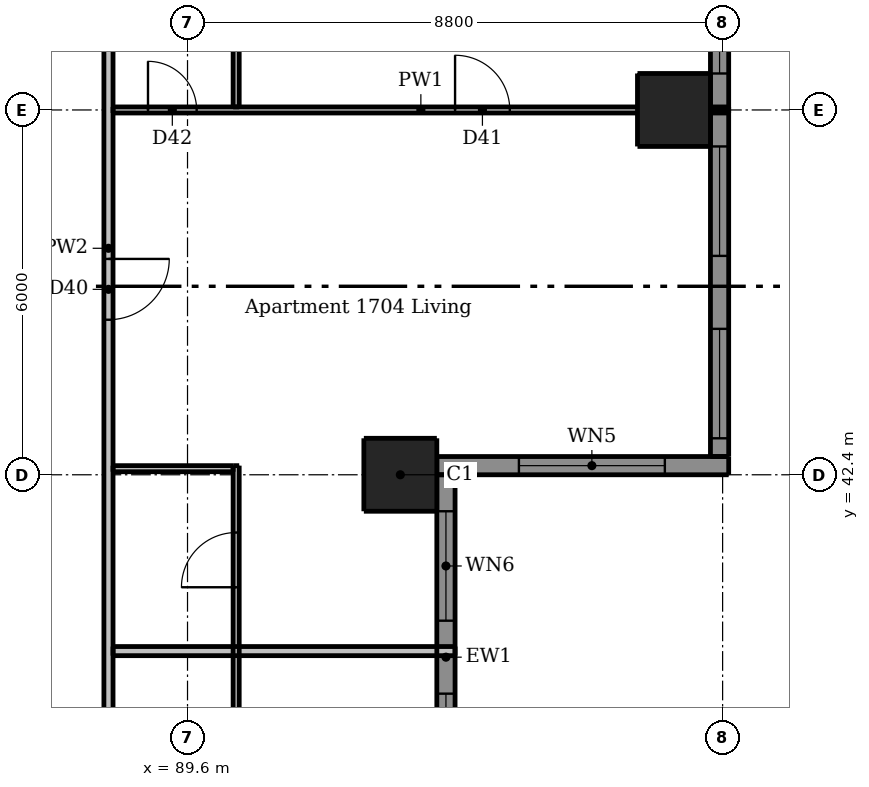
"""IFC4 building model, lengths in metres.
Left out: names, types, materials, properties, quantities, classifications, styles, units other than length and angle.
Written with IfcOpenShell. Run it as: python <this file> out.ifc"""

import sys

from ifc_helpers import new_model, si_unit, direction, frame, frame_2d, origin, origin_2d, place, context, subcontext, project, spatial, rectangle, extrude, element, fill, save


model = new_model("IFC4")
c1 = context("Model", 3, precision=1e-05, world=origin(), true_north=direction((0.0, 1.0)))
c2 = subcontext(c1, "Body", "Model", "MODEL_VIEW")
j1 = project(units=[si_unit("LENGTHUNIT", "METRE"), si_unit("PLANEANGLEUNIT", "RADIAN")], contexts=[c1])
p1 = place(None, origin())
s1 = spatial("IfcSite", under=j1, at=p1, CompositionType="ELEMENT")
p2 = place(p1, origin())
s2 = spatial("IfcBuilding", under=s1, at=p2, CompositionType="ELEMENT")
p3 = place(p2, frame((0.0, 0.0, 63.1)))
s3 = spatial("IfcBuildingStorey", under=s2, at=p3, CompositionType="ELEMENT", Elevation=63.1)
for number, where, z_axis, x_axis in (
    (1, (93.1, 42.4, 0.0), (0.0, 0.0, 1.0), (1.0, 0.0, 0.0)),
    (2, (97.6, 48.4, 0.0), (0.0, 0.0, 1.0), (1.0, 0.0, 0.0)),
):
    element("IfcColumn", number, at=place(p3, frame(where, z_axis=z_axis, x_axis=x_axis)), inside=s3, PredefinedType="COLUMN", context=c2, shape_type="SweptSolid", body=[
        extrude(rectangle(XDim=1.2, YDim=1.2, at=origin_2d()), origin(), (0.0, 0.0, 1.0), 3.05),
    ])
p4 = place(p3, frame((93.7, 42.55, 0.0), z_axis=(0.0, 0.0, 1.0), x_axis=(1.0, 0.0, 0.0)))
e3 = element("IfcWall", 3, at=p4, inside=s3, PredefinedType="SOLIDWALL", context=c2, shape_type="SweptSolid", body=[
    extrude(rectangle(XDim=4.8, YDim=0.3, at=frame_2d((2.4, 0.0))), origin(), (0.0, 0.0, 1.0), 3.05),
])
p5 = place(p4, frame((1.35, 0.0, 0.15)))
e4 = element("IfcOpeningElement", 4, at=p5, cuts=e3, PredefinedType="OPENING", context=c2, shape_type="SweptSolid", body=[
    extrude(rectangle(XDim=2.4, YDim=2.1, at=frame_2d((1.2, 1.05))), frame((0.0, 0.16, 0.0), z_axis=(0.0, -1.0, 0.0), x_axis=(1.0, 0.0, 0.0)), (0.0, 0.0, 1.0), 0.32),
])
p6 = place(p3, frame((93.85, 36.4, 0.0), z_axis=(0.0, 0.0, 1.0), x_axis=(0.0, 1.0, 0.0)))
e5 = element("IfcWall", 5, at=p6, inside=s3, PredefinedType="SOLIDWALL", context=c2, shape_type="SweptSolid", body=[
    extrude(rectangle(XDim=6.0, YDim=0.3, at=frame_2d((3.0, 0.0))), origin(), (0.0, 0.0, 1.0), 3.05),
])
p7 = place(p6, frame((0.6, 0.0, 0.15)))
e6 = element("IfcOpeningElement", 6, at=p7, cuts=e5, PredefinedType="OPENING", context=c2, shape_type="SweptSolid", body=[
    extrude(rectangle(XDim=1.8, YDim=2.1, at=frame_2d((0.9, 1.05))), frame((0.0, 0.16, 0.0), z_axis=(0.0, -1.0, 0.0), x_axis=(1.0, 0.0, 0.0)), (0.0, 0.0, 1.0), 0.32),
])
p8 = place(p6, frame((3.6, 0.0, 0.15)))
e7 = element("IfcOpeningElement", 7, at=p8, cuts=e5, PredefinedType="OPENING", context=c2, shape_type="SweptSolid", body=[
    extrude(rectangle(XDim=1.8, YDim=2.1, at=frame_2d((0.9, 1.05))), frame((0.0, 0.16, 0.0), z_axis=(0.0, -1.0, 0.0), x_axis=(1.0, 0.0, 0.0)), (0.0, 0.0, 1.0), 0.32),
])
p9 = place(p3, frame((98.35, 42.7, 0.0), z_axis=(0.0, 0.0, 1.0), x_axis=(0.0, 1.0, 0.0)))
e8 = element("IfcWall", 8, at=p9, inside=s3, PredefinedType="SOLIDWALL", context=c2, shape_type="SweptSolid", body=[
    extrude(rectangle(XDim=5.7, YDim=0.3, at=frame_2d((2.85, 0.0))), origin(), (0.0, 0.0, 1.0), 3.05),
])
p10 = place(p9, frame((0.3, 0.0, 0.15)))
e9 = element("IfcOpeningElement", 9, at=p10, cuts=e8, PredefinedType="OPENING", context=c2, shape_type="SweptSolid", body=[
    extrude(rectangle(XDim=1.8, YDim=2.1, at=frame_2d((0.9, 1.05))), frame((0.0, 0.16, 0.0), z_axis=(0.0, -1.0, 0.0), x_axis=(1.0, 0.0, 0.0)), (0.0, 0.0, 1.0), 0.32),
])
p11 = place(p9, frame((3.3, 0.0, 0.15)))
e10 = element("IfcOpeningElement", 10, at=p11, cuts=e8, PredefinedType="OPENING", context=c2, shape_type="SweptSolid", body=[
    extrude(rectangle(XDim=1.8, YDim=2.1, at=frame_2d((0.9, 1.05))), frame((0.0, 0.16, 0.0), z_axis=(0.0, -1.0, 0.0), x_axis=(1.0, 0.0, 0.0)), (0.0, 0.0, 1.0), 0.32),
])
p12 = place(p3, frame((98.35, 48.4, 0.0), z_axis=(0.0, 0.0, 1.0), x_axis=(0.0, 1.0, 0.0)))
e11 = element("IfcWall", 11, at=p12, inside=s3, PredefinedType="SOLIDWALL", context=c2, shape_type="SweptSolid", body=[
    extrude(rectangle(XDim=6.0, YDim=0.3, at=frame_2d((3.0, 0.0))), origin(), (0.0, 0.0, 1.0), 3.05),
])
p13 = place(p12, frame((0.6, 0.0, 0.15)))
e12 = element("IfcOpeningElement", 12, at=p13, cuts=e11, PredefinedType="OPENING", context=c2, shape_type="SweptSolid", body=[
    extrude(rectangle(XDim=1.8, YDim=2.1, at=frame_2d((0.9, 1.05))), frame((0.0, 0.16, 0.0), z_axis=(0.0, -1.0, 0.0), x_axis=(1.0, 0.0, 0.0)), (0.0, 0.0, 1.0), 0.32),
])
p14 = place(p12, frame((3.6, 0.0, 0.15)))
e13 = element("IfcOpeningElement", 13, at=p14, cuts=e11, PredefinedType="OPENING", context=c2, shape_type="SweptSolid", body=[
    extrude(rectangle(XDim=1.8, YDim=2.1, at=frame_2d((0.9, 1.05))), frame((0.0, 0.16, 0.0), z_axis=(0.0, -1.0, 0.0), x_axis=(1.0, 0.0, 0.0)), (0.0, 0.0, 1.0), 0.32),
])
p15 = place(p3, frame((90.4, 33.45, 0.0), z_axis=(0.0, 0.0, 1.0), x_axis=(0.0, 1.0, 0.0)))
e14 = element("IfcWall", 14, at=p15, inside=s3, PredefinedType="PARTITIONING", context=c2, shape_type="SweptSolid", body=[
    extrude(rectangle(XDim=9.1, YDim=0.1, at=frame_2d((4.55, 0.0))), origin(), (0.0, 0.0, 1.0), 3.05),
])
p16 = place(p15, frame((3.8, 0.0, 0.0)))
e15 = element("IfcOpeningElement", 15, at=p16, cuts=e14, PredefinedType="OPENING", context=c2, shape_type="SweptSolid", body=[
    extrude(rectangle(XDim=0.8, YDim=2.1, at=frame_2d((0.4, 1.05))), frame((0.0, 0.06, 0.0), z_axis=(0.0, -1.0, 0.0), x_axis=(1.0, 0.0, 0.0)), (0.0, 0.0, 1.0), 0.12),
])
p17 = place(p15, frame((7.1, 0.0, 0.0)))
e16 = element("IfcOpeningElement", 16, at=p17, cuts=e14, PredefinedType="OPENING", context=c2, shape_type="SweptSolid", body=[
    extrude(rectangle(XDim=0.9, YDim=2.1, at=frame_2d((0.45, 1.05))), frame((0.0, 0.06, 0.0), z_axis=(0.0, -1.0, 0.0), x_axis=(1.0, 0.0, 0.0)), (0.0, 0.0, 1.0), 0.12),
])
p18 = place(p3, frame((90.4, 48.45, 0.0), z_axis=(0.0, 0.0, 1.0), x_axis=(0.0, 1.0, 0.0)))
e17 = element("IfcWall", 17, at=p18, inside=s3, PredefinedType="PARTITIONING", context=c2, shape_type="SweptSolid", body=[
    extrude(rectangle(XDim=5.9, YDim=0.1, at=frame_2d((2.95, 0.0))), origin(), (0.0, 0.0, 1.0), 3.05),
])
p19 = place(p3, frame((88.375, 48.4, 0.0), z_axis=(0.0, 0.0, 1.0), x_axis=(1.0, 0.0, 0.0)))
e18 = element("IfcWall", 18, at=p19, inside=s3, PredefinedType="PARTITIONING", context=c2, shape_type="SweptSolid", body=[
    extrude(rectangle(XDim=10.125, YDim=0.1, at=frame_2d((5.062, 0.0))), origin(), (0.0, 0.0, 1.0), 2.516),
])
p20 = place(p19, frame((5.625, 0.0, 0.0)))
e19 = element("IfcOpeningElement", 19, at=p20, cuts=e18, PredefinedType="OPENING", context=c2, shape_type="SweptSolid", body=[
    extrude(rectangle(XDim=0.9, YDim=2.1, at=frame_2d((0.45, 1.05))), frame((0.0, 0.06, 0.0), z_axis=(0.0, -1.0, 0.0), x_axis=(1.0, 0.0, 0.0)), (0.0, 0.0, 1.0), 0.12),
])
p21 = place(p19, frame((0.575, 0.0, 0.0)))
e20 = element("IfcOpeningElement", 20, at=p21, cuts=e18, PredefinedType="OPENING", context=c2, shape_type="SweptSolid", body=[
    extrude(rectangle(XDim=0.8, YDim=2.1, at=frame_2d((0.4, 1.05))), frame((0.0, 0.06, 0.0), z_axis=(0.0, -1.0, 0.0), x_axis=(1.0, 0.0, 0.0)), (0.0, 0.0, 1.0), 0.12),
])
p22 = place(p3, frame((88.375, 42.5, 0.0), z_axis=(0.0, 0.0, 1.0), x_axis=(1.0, 0.0, 0.0)))
e21 = element("IfcWall", 21, at=p22, inside=s3, PredefinedType="PARTITIONING", context=c2, shape_type="SweptSolid", body=[
    extrude(rectangle(XDim=1.975, YDim=0.1, at=frame_2d((0.988, 0.0))), origin(), (0.0, 0.0, 1.0), 2.59),
])
p23 = place(p3, frame((88.3, 60.475, 0.0), z_axis=(0.0, 0.0, 1.0), x_axis=(0.0, -1.0, 0.0)))
e22 = element("IfcWall", 22, at=p23, inside=s3, PredefinedType="PARTITIONING", context=c2, shape_type="SweptSolid", body=[
    extrude(rectangle(XDim=28.7, YDim=0.15, at=frame_2d((14.35, 0.0))), origin(), (0.0, 0.0, 1.0), 3.05),
])
p24 = place(p23, frame((27.425, 0.0, 0.0)))
e23 = element("IfcOpeningElement", 23, at=p24, cuts=e22, PredefinedType="OPENING", context=c2, shape_type="SweptSolid", body=[
    extrude(rectangle(XDim=1.0, YDim=2.1, at=frame_2d((0.5, 1.05))), frame((0.0, 0.085, 0.0), z_axis=(0.0, -1.0, 0.0), x_axis=(1.0, 0.0, 0.0)), (0.0, 0.0, 1.0), 0.17),
])
p25 = place(p23, frame((14.525, 0.0, 0.0)))
e24 = element("IfcOpeningElement", 24, at=p25, cuts=e22, PredefinedType="OPENING", context=c2, shape_type="SweptSolid", body=[
    extrude(rectangle(XDim=1.0, YDim=2.1, at=frame_2d((0.5, 1.05))), frame((0.0, 0.085, 0.0), z_axis=(0.0, -1.0, 0.0), x_axis=(1.0, 0.0, 0.0)), (0.0, 0.0, 1.0), 0.17),
])
p26 = place(p23, frame((3.775, 0.0, 0.0)))
e25 = element("IfcOpeningElement", 25, at=p26, cuts=e22, PredefinedType="OPENING", context=c2, shape_type="SweptSolid", body=[
    extrude(rectangle(XDim=1.0, YDim=2.1, at=frame_2d((0.5, 1.05))), frame((0.0, 0.085, 0.0), z_axis=(0.0, -1.0, 0.0), x_axis=(1.0, 0.0, 0.0)), (0.0, 0.0, 1.0), 0.17),
])
p27 = place(p3, frame((88.375, 39.5, 0.0), z_axis=(0.0, 0.0, 1.0), x_axis=(1.0, 0.0, 0.0)))
e26 = element("IfcWall", 26, at=p27, inside=s3, PredefinedType="PARTITIONING", context=c2, shape_type="SweptSolid", body=[
    extrude(rectangle(XDim=5.625, YDim=0.15, at=frame_2d((2.812, 0.0))), origin(), (0.0, 0.0, 1.0), 3.05),
])
p28 = place(p5, origin())
e27 = element("IfcWindow", 27, at=p28, inside=s3, PartitioningType="DOUBLE_PANEL_VERTICAL", PredefinedType="WINDOW", context=c2, shape_type="SweptSolid", body=[
    extrude(rectangle(XDim=2.4, YDim=2.1, at=frame_2d((1.2, 1.05))), frame((0.0, 0.03, 0.0), z_axis=(0.0, -1.0, 0.0), x_axis=(1.0, 0.0, 0.0)), (0.0, 0.0, 1.0), 0.06),
])
fill(e4, e27)
p29 = place(p7, origin())
e28 = element("IfcWindow", 28, at=p29, inside=s3, PartitioningType="DOUBLE_PANEL_VERTICAL", PredefinedType="WINDOW", context=c2, shape_type="SweptSolid", body=[
    extrude(rectangle(XDim=1.8, YDim=2.1, at=frame_2d((0.9, 1.05))), frame((0.0, 0.03, 0.0), z_axis=(0.0, -1.0, 0.0), x_axis=(1.0, 0.0, 0.0)), (0.0, 0.0, 1.0), 0.06),
])
fill(e6, e28)
p30 = place(p8, origin())
e29 = element("IfcWindow", 29, at=p30, inside=s3, PartitioningType="DOUBLE_PANEL_VERTICAL", PredefinedType="WINDOW", context=c2, shape_type="SweptSolid", body=[
    extrude(rectangle(XDim=1.8, YDim=2.1, at=frame_2d((0.9, 1.05))), frame((0.0, 0.03, 0.0), z_axis=(0.0, -1.0, 0.0), x_axis=(1.0, 0.0, 0.0)), (0.0, 0.0, 1.0), 0.06),
])
fill(e7, e29)
p31 = place(p10, origin())
e30 = element("IfcWindow", 30, at=p31, inside=s3, PartitioningType="DOUBLE_PANEL_VERTICAL", PredefinedType="WINDOW", context=c2, shape_type="SweptSolid", body=[
    extrude(rectangle(XDim=1.8, YDim=2.1, at=frame_2d((0.9, 1.05))), frame((0.0, 0.03, 0.0), z_axis=(0.0, -1.0, 0.0), x_axis=(1.0, 0.0, 0.0)), (0.0, 0.0, 1.0), 0.06),
])
fill(e9, e30)
p32 = place(p11, origin())
e31 = element("IfcWindow", 31, at=p32, inside=s3, PartitioningType="DOUBLE_PANEL_VERTICAL", PredefinedType="WINDOW", context=c2, shape_type="SweptSolid", body=[
    extrude(rectangle(XDim=1.8, YDim=2.1, at=frame_2d((0.9, 1.05))), frame((0.0, 0.03, 0.0), z_axis=(0.0, -1.0, 0.0), x_axis=(1.0, 0.0, 0.0)), (0.0, 0.0, 1.0), 0.06),
])
fill(e10, e31)
p33 = place(p13, origin())
e32 = element("IfcWindow", 32, at=p33, inside=s3, PartitioningType="DOUBLE_PANEL_VERTICAL", PredefinedType="WINDOW", context=c2, shape_type="SweptSolid", body=[
    extrude(rectangle(XDim=1.8, YDim=2.1, at=frame_2d((0.9, 1.05))), frame((0.0, 0.03, 0.0), z_axis=(0.0, -1.0, 0.0), x_axis=(1.0, 0.0, 0.0)), (0.0, 0.0, 1.0), 0.06),
])
fill(e12, e32)
p34 = place(p25, origin())
e33 = element("IfcDoor", 33, at=p34, inside=s3, OperationType="SINGLE_SWING_LEFT", PredefinedType="DOOR", context=c2, shape_type="SweptSolid", body=[
    extrude(rectangle(XDim=1.0, YDim=2.1, at=frame_2d((0.5, 1.05))), frame((0.0, 0.025, 0.0), z_axis=(0.0, -1.0, 0.0), x_axis=(1.0, 0.0, 0.0)), (0.0, 0.0, 1.0), 0.05),
])
fill(e24, e33)
p35 = place(p17, origin())
e34 = element("IfcDoor", 34, at=p35, inside=s3, OperationType="SINGLE_SWING_LEFT", PredefinedType="DOOR", context=c2, shape_type="SweptSolid", body=[
    extrude(rectangle(XDim=0.9, YDim=2.1, at=frame_2d((0.45, 1.05))), frame((0.0, 0.025, 0.0), z_axis=(0.0, -1.0, 0.0), x_axis=(1.0, 0.0, 0.0)), (0.0, 0.0, 1.0), 0.05),
])
fill(e16, e34)
p36 = place(p20, origin())
e35 = element("IfcDoor", 35, at=p36, inside=s3, OperationType="SINGLE_SWING_LEFT", PredefinedType="DOOR", context=c2, shape_type="SweptSolid", body=[
    extrude(rectangle(XDim=0.9, YDim=2.1, at=frame_2d((0.45, 1.05))), frame((0.0, 0.025, 0.0), z_axis=(0.0, -1.0, 0.0), x_axis=(1.0, 0.0, 0.0)), (0.0, 0.0, 1.0), 0.05),
])
fill(e19, e35)
p37 = place(p21, origin())
e36 = element("IfcDoor", 36, at=p37, inside=s3, OperationType="SINGLE_SWING_LEFT", PredefinedType="DOOR", context=c2, shape_type="SweptSolid", body=[
    extrude(rectangle(XDim=0.8, YDim=2.1, at=frame_2d((0.4, 1.05))), frame((0.0, 0.025, 0.0), z_axis=(0.0, -1.0, 0.0), x_axis=(1.0, 0.0, 0.0)), (0.0, 0.0, 1.0), 0.05),
])
fill(e20, e36)
save(model, sys.argv[1])
